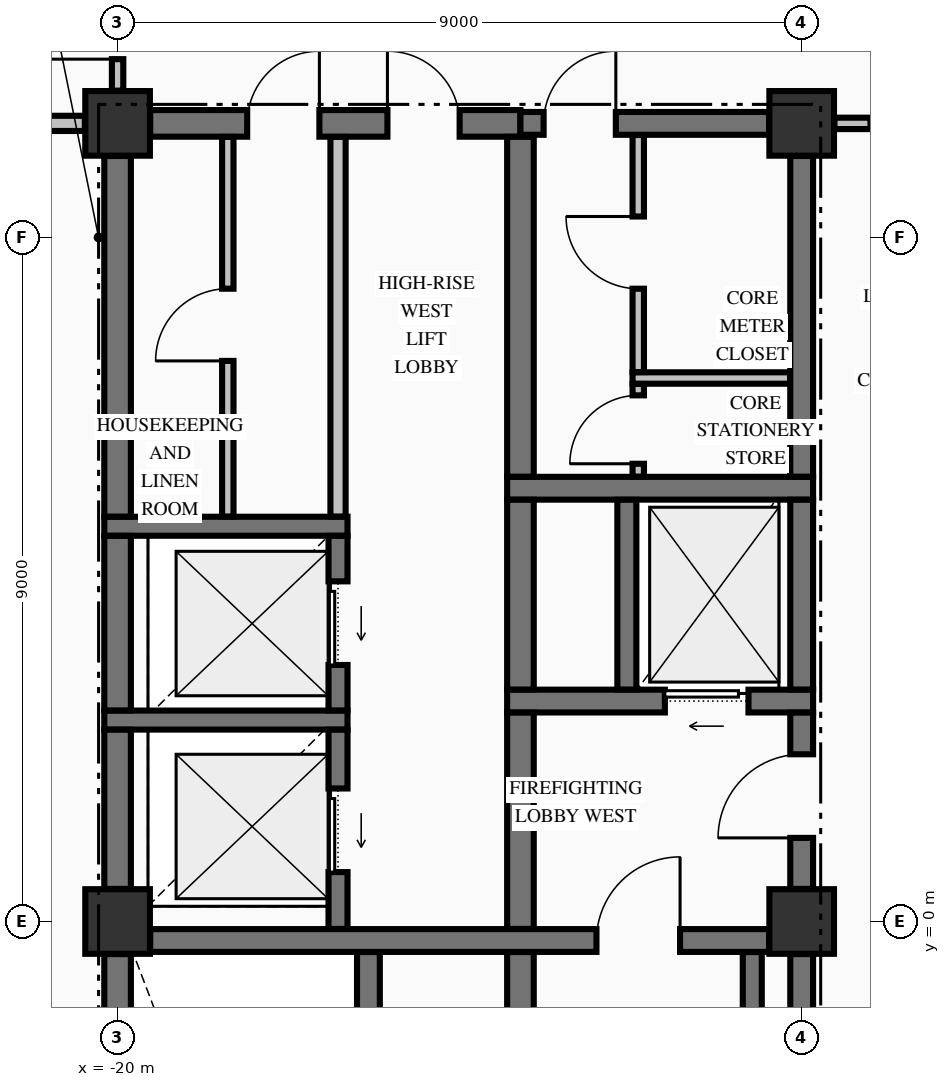
"""IFC4 building model, lengths in metres.
Left out: names, types, materials, properties, quantities, classifications, styles, units other than length and angle.
Written with IfcOpenShell. Run it as: python <this file> out.ifc"""

import sys

from ifc_helpers import new_model, si_unit, direction, frame, frame_2d, origin, origin_2d, place, context, subcontext, project, spatial, rectangle, extrude, element, fill, save


model = new_model("IFC4")
c1 = context("Model", 3, precision=1e-05, world=origin(), true_north=direction((0.0, 1.0)))
c2 = subcontext(c1, "Body", "Model", "MODEL_VIEW")
j1 = project(units=[si_unit("LENGTHUNIT", "METRE"), si_unit("PLANEANGLEUNIT", "RADIAN")], contexts=[c1])
p1 = place(None, origin())
s1 = spatial("IfcSite", under=j1, at=p1, CompositionType="ELEMENT")
p2 = place(p1, origin())
s2 = spatial("IfcBuilding", under=s1, at=p2, CompositionType="ELEMENT")
p3 = place(p2, frame((0.0, 0.0, 218.66)))
s3 = spatial("IfcBuildingStorey", under=s2, at=p3, CompositionType="ELEMENT", Elevation=218.66)
for number, where, z_axis, x_axis in (
    (1, (-20.0, 10.5, -0.25), (0.0, 0.0, 1.0), (1.0, 0.0, 0.0)),
    (2, (-11.0, 0.0, -0.25), (0.0, 0.0, 1.0), (1.0, 0.0, 0.0)),
    (3, (-11.0, 10.5, -0.25), (0.0, 0.0, 1.0), (1.0, 0.0, 0.0)),
    (4, (-20.0, 0.0, -0.25), (0.0, 0.0, 1.0), (1.0, 0.0, 0.0)),
):
    element("IfcColumn", number, at=place(p3, frame(where, z_axis=z_axis, x_axis=x_axis)), inside=s3, PredefinedType="COLUMN", context=c2, shape_type="SweptSolid", body=[
        extrude(rectangle(XDim=0.85, YDim=0.85, at=origin_2d()), origin(), (0.0, 0.0, 1.0), 3.225),
    ])
p4 = place(p3, frame((-19.571, -0.25, 0.0), z_axis=(0.0, 0.0, 1.0), x_axis=(1.0, 0.0, 0.0)))
e5 = element("IfcWall", 5, at=p4, inside=s3, PredefinedType="SHEAR", context=c2, shape_type="SweptSolid", body=[
    extrude(rectangle(XDim=8.142, YDim=0.3, at=frame_2d((4.071, 0.0))), origin(), (0.0, 0.0, 1.0), 2.975),
])
p5 = place(p4, frame((5.871, 0.0, 0.0)))
e6 = element("IfcOpeningElement", 6, at=p5, cuts=e5, PredefinedType="OPENING", context=c2, shape_type="SweptSolid", body=[
    extrude(rectangle(XDim=1.1, YDim=2.15, at=frame_2d((0.55, 1.075))), frame((0.0, 0.16, 0.0), z_axis=(0.0, -1.0, 0.0), x_axis=(1.0, 0.0, 0.0)), (0.0, 0.0, 1.0), 0.32),
])
p6 = place(p3, frame((-20.175, 2.65, 0.0), z_axis=(0.0, 0.0, 1.0), x_axis=(1.0, 0.0, 0.0)))
e7 = element("IfcWall", 7, at=p6, inside=s3, PredefinedType="SOLIDWALL", context=c2, shape_type="SweptSolid", body=[
    extrude(rectangle(XDim=3.2, YDim=0.25, at=frame_2d((1.6, 0.0))), origin(), (0.0, 0.0, 1.0), 2.975),
])
p7 = place(p3, frame((-14.875, 2.9, 0.0), z_axis=(0.0, 0.0, 1.0), x_axis=(1.0, 0.0, 0.0)))
e8 = element("IfcWall", 8, at=p7, inside=s3, PredefinedType="SHEAR", context=c2, shape_type="SweptSolid", body=[
    extrude(rectangle(XDim=4.025, YDim=0.3, at=frame_2d((2.012, 0.0))), origin(), (0.0, 0.0, 1.0), 2.975),
])
p8 = place(p7, frame((2.075, 0.0, 0.0)))
e9 = element("IfcOpeningElement", 9, at=p8, cuts=e8, PredefinedType="OPENING", context=c2, shape_type="SweptSolid", body=[
    extrude(rectangle(XDim=1.1, YDim=2.2, at=frame_2d((0.55, 1.1))), frame((0.0, 0.16, 0.0), z_axis=(0.0, -1.0, 0.0), x_axis=(1.0, 0.0, 0.0)), (0.0, 0.0, 1.0), 0.32),
])
p9 = place(p3, frame((-20.175, 5.2, 0.0), z_axis=(0.0, 0.0, 1.0), x_axis=(1.0, 0.0, 0.0)))
e10 = element("IfcWall", 10, at=p9, inside=s3, PredefinedType="SOLIDWALL", context=c2, shape_type="SweptSolid", body=[
    extrude(rectangle(XDim=3.2, YDim=0.25, at=frame_2d((1.6, 0.0))), origin(), (0.0, 0.0, 1.0), 2.975),
])
p10 = place(p3, frame((-14.875, 5.7, 0.0), z_axis=(0.0, 0.0, 1.0), x_axis=(1.0, 0.0, 0.0)))
e11 = element("IfcWall", 11, at=p10, inside=s3, PredefinedType="SHEAR", context=c2, shape_type="SweptSolid", body=[
    extrude(rectangle(XDim=4.025, YDim=0.3, at=frame_2d((2.012, 0.0))), origin(), (0.0, 0.0, 1.0), 2.975),
])
p11 = place(p3, frame((-19.571, 10.5, 0.0), z_axis=(0.0, 0.0, 1.0), x_axis=(1.0, 0.0, 0.0)))
e12 = element("IfcWall", 12, at=p11, inside=s3, PredefinedType="SHEAR", context=c2, shape_type="SweptSolid", body=[
    extrude(rectangle(XDim=4.871, YDim=0.35, at=frame_2d((2.436, 0.0))), origin(), (0.0, 0.0, 1.0), 2.975),
])
p12 = place(p11, frame((3.121, 0.0, 0.0)))
e13 = element("IfcOpeningElement", 13, at=p12, cuts=e12, PredefinedType="OPENING", context=c2, shape_type="SweptSolid", body=[
    extrude(rectangle(XDim=0.95, YDim=2.02, at=frame_2d((0.475, 1.01))), frame((0.0, 0.185, 0.0), z_axis=(0.0, -1.0, 0.0), x_axis=(1.0, 0.0, 0.0)), (0.0, 0.0, 1.0), 0.37),
])
p13 = place(p11, frame((1.276, 0.0, 0.0)))
e14 = element("IfcOpeningElement", 14, at=p13, cuts=e12, PredefinedType="OPENING", context=c2, shape_type="SweptSolid", body=[
    extrude(rectangle(XDim=0.95, YDim=2.02, at=frame_2d((0.475, 1.01))), frame((0.0, 0.185, 0.0), z_axis=(0.0, -1.0, 0.0), x_axis=(1.0, 0.0, 0.0)), (0.0, 0.0, 1.0), 0.37),
])
p14 = place(p3, frame((-14.7, 10.5, 0.0), z_axis=(0.0, 0.0, 1.0), x_axis=(1.0, 0.0, 0.0)))
e15 = element("IfcWall", 15, at=p14, inside=s3, PredefinedType="SHEAR", context=c2, shape_type="SweptSolid", body=[
    extrude(rectangle(XDim=3.271, YDim=0.3, at=frame_2d((1.635, 0.0))), origin(), (0.0, 0.0, 1.0), 2.975),
])
p15 = place(p14, frame((0.305, 0.0, 0.0)))
e16 = element("IfcOpeningElement", 16, at=p15, cuts=e15, PredefinedType="OPENING", context=c2, shape_type="SweptSolid", body=[
    extrude(rectangle(XDim=0.95, YDim=2.02, at=frame_2d((0.475, 1.01))), frame((0.0, 0.16, 0.0), z_axis=(0.0, -1.0, 0.0), x_axis=(1.0, 0.0, 0.0)), (0.0, 0.0, 1.0), 0.32),
])
p16 = place(p3, frame((-13.225, 7.15, 0.0), z_axis=(0.0, 0.0, 1.0), x_axis=(1.0, 0.0, 0.0)))
e17 = element("IfcWall", 17, at=p16, inside=s3, PredefinedType="PARTITIONING", context=c2, shape_type="SweptSolid", body=[
    extrude(rectangle(XDim=2.072, YDim=0.15, at=frame_2d((1.036, 0.0))), origin(), (0.0, 0.0, 1.0), 2.975),
])
p17 = place(p3, frame((-26.835, 10.5, 0.0), z_axis=(0.0, 0.0, 1.0), x_axis=(1.0, 0.0, 0.0)))
e18 = element("IfcWall", 18, at=p17, inside=s3, PredefinedType="PARTITIONING", context=c2, shape_type="SweptSolid", body=[
    extrude(rectangle(XDim=6.404, YDim=0.2, at=frame_2d((3.202, 0.0))), origin(), (0.0, 0.0, 1.0), 2.975),
])
p18 = place(p17, frame((2.86, 0.0, 0.0)))
e19 = element("IfcOpeningElement", 19, at=p18, cuts=e18, PredefinedType="OPENING", context=c2, shape_type="SweptSolid", body=[
    extrude(rectangle(XDim=0.95, YDim=2.15, at=frame_2d((0.475, 1.075))), frame((0.0, 0.11, 0.0), z_axis=(0.0, -1.0, 0.0), x_axis=(1.0, 0.0, 0.0)), (0.0, 0.0, 1.0), 0.22),
])
p19 = place(p3, frame((-10.569, 10.5, 0.0), z_axis=(0.0, 0.0, 1.0), x_axis=(1.0, 0.0, 0.0)))
e20 = element("IfcWall", 20, at=p19, inside=s3, PredefinedType="PARTITIONING", context=c2, shape_type="SweptSolid", body=[
    extrude(rectangle(XDim=21.138, YDim=0.15, at=frame_2d((10.569, 0.0))), origin(), (0.0, 0.0, 1.0), 2.975),
])
p20 = place(p19, frame((0.474, 0.0, 0.0)))
e21 = element("IfcOpeningElement", 21, at=p20, cuts=e20, PredefinedType="OPENING", context=c2, shape_type="SweptSolid", body=[
    extrude(rectangle(XDim=1.05, YDim=2.15, at=frame_2d((0.525, 1.075))), frame((0.0, 0.085, 0.0), z_axis=(0.0, -1.0, 0.0), x_axis=(1.0, 0.0, 0.0)), (0.0, 0.0, 1.0), 0.17),
])
p21 = place(p19, frame((19.614, 0.0, 0.0)))
e22 = element("IfcOpeningElement", 22, at=p21, cuts=e20, PredefinedType="OPENING", context=c2, shape_type="SweptSolid", body=[
    extrude(rectangle(XDim=1.05, YDim=2.15, at=frame_2d((0.525, 1.075))), frame((0.0, 0.085, 0.0), z_axis=(0.0, -1.0, 0.0), x_axis=(1.0, 0.0, 0.0)), (0.0, 0.0, 1.0), 0.17),
])
p22 = place(p3, frame((-20.0, -9.521, 0.0), z_axis=(0.0, 0.0, 1.0), x_axis=(0.0, 1.0, 0.0)))
e23 = element("IfcWall", 23, at=p22, inside=s3, PredefinedType="SHEAR", context=c2, shape_type="SweptSolid", body=[
    extrude(rectangle(XDim=9.092, YDim=0.35, at=frame_2d((4.546, 0.0))), origin(), (0.0, 0.0, 1.0), 2.975),
])
p23 = place(p3, frame((-20.0, 0.429, 0.0), z_axis=(0.0, 0.0, 1.0), x_axis=(0.0, 1.0, 0.0)))
e24 = element("IfcWall", 24, at=p23, inside=s3, PredefinedType="SHEAR", context=c2, shape_type="SweptSolid", body=[
    extrude(rectangle(XDim=2.094, YDim=0.35, at=frame_2d((1.047, 0.0))), origin(), (0.0, 0.0, 1.0), 2.975),
])
p24 = place(p3, frame((-20.0, 2.777, 0.0), z_axis=(0.0, 0.0, 1.0), x_axis=(0.0, 1.0, 0.0)))
e25 = element("IfcWall", 25, at=p24, inside=s3, PredefinedType="SHEAR", context=c2, shape_type="SweptSolid", body=[
    extrude(rectangle(XDim=2.296, YDim=0.35, at=frame_2d((1.148, 0.0))), origin(), (0.0, 0.0, 1.0), 2.975),
])
p25 = place(p3, frame((-20.0, 5.327, 0.0), z_axis=(0.0, 0.0, 1.0), x_axis=(0.0, 1.0, 0.0)))
e26 = element("IfcWall", 26, at=p25, inside=s3, PredefinedType="SHEAR", context=c2, shape_type="SweptSolid", body=[
    extrude(rectangle(XDim=4.744, YDim=0.35, at=frame_2d((2.372, 0.0))), origin(), (0.0, 0.0, 1.0), 2.975),
])
p26 = place(p3, frame((-17.1, -0.098, 0.0), z_axis=(0.0, 0.0, 1.0), x_axis=(0.0, 1.0, 0.0)))
e27 = element("IfcWall", 27, at=p26, inside=s3, PredefinedType="SOLIDWALL", context=c2, shape_type="SweptSolid", body=[
    extrude(rectangle(XDim=2.621, YDim=0.25, at=frame_2d((1.311, 0.0))), origin(), (0.0, 0.0, 1.0), 2.975),
])
p27 = place(p26, frame((0.748, 0.0, 0.0)))
e28 = element("IfcOpeningElement", 28, at=p27, cuts=e27, PredefinedType="OPENING", context=c2, shape_type="SweptSolid", body=[
    extrude(rectangle(XDim=1.1, YDim=2.2, at=frame_2d((0.55, 1.1))), frame((0.0, 0.135, 0.0), z_axis=(0.0, -1.0, 0.0), x_axis=(1.0, 0.0, 0.0)), (0.0, 0.0, 1.0), 0.27),
])
p28 = place(p3, frame((-17.1, 2.777, 0.0), z_axis=(0.0, 0.0, 1.0), x_axis=(0.0, 1.0, 0.0)))
e29 = element("IfcWall", 29, at=p28, inside=s3, PredefinedType="SOLIDWALL", context=c2, shape_type="SweptSolid", body=[
    extrude(rectangle(XDim=2.296, YDim=0.25, at=frame_2d((1.148, 0.0))), origin(), (0.0, 0.0, 1.0), 2.975),
])
p29 = place(p28, frame((0.598, 0.0, 0.0)))
e30 = element("IfcOpeningElement", 30, at=p29, cuts=e29, PredefinedType="OPENING", context=c2, shape_type="SweptSolid", body=[
    extrude(rectangle(XDim=1.1, YDim=2.2, at=frame_2d((0.55, 1.1))), frame((0.0, 0.135, 0.0), z_axis=(0.0, -1.0, 0.0), x_axis=(1.0, 0.0, 0.0)), (0.0, 0.0, 1.0), 0.27),
])
p30 = place(p3, frame((-16.7, -9.773, 0.0), z_axis=(0.0, 0.0, 1.0), x_axis=(0.0, 1.0, 0.0)))
e31 = element("IfcWall", 31, at=p30, inside=s3, PredefinedType="SHEAR", context=c2, shape_type="SweptSolid", body=[
    extrude(rectangle(XDim=9.371, YDim=0.3, at=frame_2d((4.686, 0.0))), origin(), (0.0, 0.0, 1.0), 2.975),
])
p31 = place(p3, frame((-14.7, -9.773, 0.0), z_axis=(0.0, 0.0, 1.0), x_axis=(0.0, 1.0, 0.0)))
e32 = element("IfcWall", 32, at=p31, inside=s3, PredefinedType="SHEAR", context=c2, shape_type="SweptSolid", body=[
    extrude(rectangle(XDim=9.371, YDim=0.35, at=frame_2d((4.686, 0.0))), origin(), (0.0, 0.0, 1.0), 2.975),
])
p32 = place(p3, frame((-14.7, -0.098, 0.0), z_axis=(0.0, 0.0, 1.0), x_axis=(0.0, 1.0, 0.0)))
e33 = element("IfcWall", 33, at=p32, inside=s3, PredefinedType="SHEAR", context=c2, shape_type="SweptSolid", body=[
    extrude(rectangle(XDim=2.846, YDim=0.35, at=frame_2d((1.423, 0.0))), origin(), (0.0, 0.0, 1.0), 2.975),
])
p33 = place(p3, frame((-14.7, 3.052, 0.0), z_axis=(0.0, 0.0, 1.0), x_axis=(0.0, 1.0, 0.0)))
e34 = element("IfcWall", 34, at=p33, inside=s3, PredefinedType="SHEAR", context=c2, shape_type="SweptSolid", body=[
    extrude(rectangle(XDim=2.496, YDim=0.35, at=frame_2d((1.248, 0.0))), origin(), (0.0, 0.0, 1.0), 2.975),
])
p34 = place(p3, frame((-14.7, 5.852, 0.0), z_axis=(0.0, 0.0, 1.0), x_axis=(0.0, 1.0, 0.0)))
e35 = element("IfcWall", 35, at=p34, inside=s3, PredefinedType="SHEAR", context=c2, shape_type="SweptSolid", body=[
    extrude(rectangle(XDim=4.471, YDim=0.35, at=frame_2d((2.235, 0.0))), origin(), (0.0, 0.0, 1.0), 2.975),
])
p35 = place(p3, frame((-13.3, 3.052, 0.0), z_axis=(0.0, 0.0, 1.0), x_axis=(0.0, 1.0, 0.0)))
e36 = element("IfcWall", 36, at=p35, inside=s3, PredefinedType="SOLIDWALL", context=c2, shape_type="SweptSolid", body=[
    extrude(rectangle(XDim=2.496, YDim=0.25, at=frame_2d((1.248, 0.0))), origin(), (0.0, 0.0, 1.0), 2.975),
])
p36 = place(p3, frame((-11.65, -9.798, 0.0), z_axis=(0.0, 0.0, 1.0), x_axis=(0.0, 1.0, 0.0)))
e37 = element("IfcWall", 37, at=p36, inside=s3, PredefinedType="SOLIDWALL", context=c2, shape_type="SweptSolid", body=[
    extrude(rectangle(XDim=9.396, YDim=0.25, at=frame_2d((4.698, 0.0))), origin(), (0.0, 0.0, 1.0), 2.975),
])
p37 = place(p3, frame((-11.0, -9.521, 0.0), z_axis=(0.0, 0.0, 1.0), x_axis=(0.0, 1.0, 0.0)))
e38 = element("IfcWall", 38, at=p37, inside=s3, PredefinedType="SHEAR", context=c2, shape_type="SweptSolid", body=[
    extrude(rectangle(XDim=9.092, YDim=0.3, at=frame_2d((4.546, 0.0))), origin(), (0.0, 0.0, 1.0), 2.975),
])
p38 = place(p3, frame((-11.0, 0.429, 0.0), z_axis=(0.0, 0.0, 1.0), x_axis=(0.0, 1.0, 0.0)))
e39 = element("IfcWall", 39, at=p38, inside=s3, PredefinedType="SHEAR", context=c2, shape_type="SweptSolid", body=[
    extrude(rectangle(XDim=2.319, YDim=0.3, at=frame_2d((1.16, 0.0))), origin(), (0.0, 0.0, 1.0), 2.975),
])
p39 = place(p38, frame((0.671, 0.0, 0.0)))
e40 = element("IfcOpeningElement", 40, at=p39, cuts=e39, PredefinedType="OPENING", context=c2, shape_type="SweptSolid", body=[
    extrude(rectangle(XDim=1.1, YDim=2.15, at=frame_2d((0.55, 1.075))), frame((0.0, 0.16, 0.0), z_axis=(0.0, -1.0, 0.0), x_axis=(1.0, 0.0, 0.0)), (0.0, 0.0, 1.0), 0.32),
])
p40 = place(p3, frame((-11.0, 3.052, 0.0), z_axis=(0.0, 0.0, 1.0), x_axis=(0.0, 1.0, 0.0)))
e41 = element("IfcWall", 41, at=p40, inside=s3, PredefinedType="SHEAR", context=c2, shape_type="SweptSolid", body=[
    extrude(rectangle(XDim=2.496, YDim=0.3, at=frame_2d((1.248, 0.0))), origin(), (0.0, 0.0, 1.0), 2.975),
])
p41 = place(p3, frame((-11.0, 5.852, 0.0), z_axis=(0.0, 0.0, 1.0), x_axis=(0.0, 1.0, 0.0)))
e42 = element("IfcWall", 42, at=p41, inside=s3, PredefinedType="SHEAR", context=c2, shape_type="SweptSolid", body=[
    extrude(rectangle(XDim=4.219, YDim=0.3, at=frame_2d((2.109, 0.0))), origin(), (0.0, 0.0, 1.0), 2.975),
])
p42 = place(p3, frame((-20.0, 10.931, 0.0), z_axis=(0.0, 0.0, 1.0), x_axis=(0.0, 1.0, 0.0)))
e43 = element("IfcWall", 43, at=p42, inside=s3, PredefinedType="PARTITIONING", context=c2, shape_type="SweptSolid", body=[
    extrude(rectangle(XDim=2.116, YDim=0.15, at=frame_2d((1.058, 0.0))), origin(), (0.0, 0.0, 1.0), 2.167),
])
p43 = place(p42, frame((0.414, 0.0, 0.0)))
e44 = element("IfcOpeningElement", 44, at=p43, cuts=e43, PredefinedType="OPENING", context=c2, shape_type="SweptSolid", body=[
    extrude(rectangle(XDim=0.95, YDim=2.02, at=frame_2d((0.475, 1.01))), frame((0.0, 0.085, 0.0), z_axis=(0.0, -1.0, 0.0), x_axis=(1.0, 0.0, 0.0)), (0.0, 0.0, 1.0), 0.17),
])
p44 = place(p3, frame((-18.55, 5.328, 0.0), z_axis=(0.0, 0.0, 1.0), x_axis=(0.0, 1.0, 0.0)))
e45 = element("IfcWall", 45, at=p44, inside=s3, PredefinedType="PARTITIONING", context=c2, shape_type="SweptSolid", body=[
    extrude(rectangle(XDim=4.994, YDim=0.15, at=frame_2d((2.497, 0.0))), origin(), (0.0, 0.0, 1.0), 2.975),
])
p45 = place(p44, frame((2.047, 0.0, 0.0)))
e46 = element("IfcOpeningElement", 46, at=p45, cuts=e45, PredefinedType="OPENING", context=c2, shape_type="SweptSolid", body=[
    extrude(rectangle(XDim=0.95, YDim=2.15, at=frame_2d((0.475, 1.075))), frame((0.0, 0.085, 0.0), z_axis=(0.0, -1.0, 0.0), x_axis=(1.0, 0.0, 0.0)), (0.0, 0.0, 1.0), 0.17),
])
p46 = place(p3, frame((-17.1, 5.328, 0.0), z_axis=(0.0, 0.0, 1.0), x_axis=(0.0, 1.0, 0.0)))
e47 = element("IfcWall", 47, at=p46, inside=s3, PredefinedType="PARTITIONING", context=c2, shape_type="SweptSolid", body=[
    extrude(rectangle(XDim=4.994, YDim=0.2, at=frame_2d((2.497, 0.0))), origin(), (0.0, 0.0, 1.0), 2.975),
])
p47 = place(p3, frame((-13.15, 5.853, 0.0), z_axis=(0.0, 0.0, 1.0), x_axis=(0.0, 1.0, 0.0)))
e48 = element("IfcWall", 48, at=p47, inside=s3, PredefinedType="PARTITIONING", context=c2, shape_type="SweptSolid", body=[
    extrude(rectangle(XDim=1.219, YDim=0.15, at=frame_2d((0.609, 0.0))), origin(), (0.0, 0.0, 1.0), 2.975),
])
p48 = place(p47, frame((0.169, 0.0, 0.0)))
e49 = element("IfcOpeningElement", 49, at=p48, cuts=e48, PredefinedType="OPENING", context=c2, shape_type="SweptSolid", body=[
    extrude(rectangle(XDim=0.9, YDim=2.15, at=frame_2d((0.45, 1.075))), frame((0.0, 0.085, 0.0), z_axis=(0.0, -1.0, 0.0), x_axis=(1.0, 0.0, 0.0)), (0.0, 0.0, 1.0), 0.17),
])
p49 = place(p3, frame((-13.15, 7.228, 0.0), z_axis=(0.0, 0.0, 1.0), x_axis=(0.0, 1.0, 0.0)))
e50 = element("IfcWall", 50, at=p49, inside=s3, PredefinedType="PARTITIONING", context=c2, shape_type="SweptSolid", body=[
    extrude(rectangle(XDim=3.119, YDim=0.15, at=frame_2d((1.56, 0.0))), origin(), (0.0, 0.0, 1.0), 2.975),
])
p50 = place(p49, frame((1.097, 0.0, 0.0)))
e51 = element("IfcOpeningElement", 51, at=p50, cuts=e50, PredefinedType="OPENING", context=c2, shape_type="SweptSolid", body=[
    extrude(rectangle(XDim=0.95, YDim=2.15, at=frame_2d((0.475, 1.075))), frame((0.0, 0.085, 0.0), z_axis=(0.0, -1.0, 0.0), x_axis=(1.0, 0.0, 0.0)), (0.0, 0.0, 1.0), 0.17),
])
p51 = place(p5, origin())
e52 = element("IfcDoor", 52, at=p51, inside=s3, OperationType="SINGLE_SWING_RIGHT", PredefinedType="DOOR", context=c2, shape_type="SweptSolid", body=[
    extrude(rectangle(XDim=1.1, YDim=2.15, at=frame_2d((0.55, 1.075))), frame((0.0, 0.025, 0.0), z_axis=(0.0, -1.0, 0.0), x_axis=(1.0, 0.0, 0.0)), (0.0, 0.0, 1.0), 0.05),
])
fill(e6, e52)
p52 = place(p39, origin())
e53 = element("IfcDoor", 53, at=p52, inside=s3, OperationType="SINGLE_SWING_LEFT", PredefinedType="DOOR", context=c2, shape_type="SweptSolid", body=[
    extrude(rectangle(XDim=1.1, YDim=2.15, at=frame_2d((0.55, 1.075))), frame((0.0, 0.025, 0.0), z_axis=(0.0, -1.0, 0.0), x_axis=(1.0, 0.0, 0.0)), (0.0, 0.0, 1.0), 0.05),
])
fill(e40, e53)
p53 = place(p8, origin())
e54 = element("IfcDoor", 54, at=p53, inside=s3, OperationType="SLIDING_TO_LEFT", PredefinedType="DOOR", context=c2, shape_type="SweptSolid", body=[
    extrude(rectangle(XDim=1.1, YDim=2.2, at=frame_2d((0.55, 1.1))), frame((0.0, 0.025, 0.0), z_axis=(0.0, -1.0, 0.0), x_axis=(1.0, 0.0, 0.0)), (0.0, 0.0, 1.0), 0.05),
])
fill(e9, e54)
p54 = place(p15, origin())
e55 = element("IfcDoor", 55, at=p54, inside=s3, OperationType="SINGLE_SWING_RIGHT", PredefinedType="DOOR", context=c2, shape_type="SweptSolid", body=[
    extrude(rectangle(XDim=0.95, YDim=2.02, at=frame_2d((0.475, 1.01))), frame((0.0, 0.025, 0.0), z_axis=(0.0, -1.0, 0.0), x_axis=(1.0, 0.0, 0.0)), (0.0, 0.0, 1.0), 0.05),
])
fill(e16, e55)
p55 = place(p48, origin())
e56 = element("IfcDoor", 56, at=p55, inside=s3, OperationType="SINGLE_SWING_LEFT", PredefinedType="DOOR", context=c2, shape_type="SweptSolid", body=[
    extrude(rectangle(XDim=0.9, YDim=2.15, at=frame_2d((0.45, 1.075))), frame((0.0, 0.025, 0.0), z_axis=(0.0, -1.0, 0.0), x_axis=(1.0, 0.0, 0.0)), (0.0, 0.0, 1.0), 0.05),
])
fill(e49, e56)
p56 = place(p50, origin())
e57 = element("IfcDoor", 57, at=p56, inside=s3, OperationType="SINGLE_SWING_RIGHT", PredefinedType="DOOR", context=c2, shape_type="SweptSolid", body=[
    extrude(rectangle(XDim=0.95, YDim=2.15, at=frame_2d((0.475, 1.075))), frame((0.0, 0.025, 0.0), z_axis=(0.0, -1.0, 0.0), x_axis=(1.0, 0.0, 0.0)), (0.0, 0.0, 1.0), 0.05),
])
fill(e51, e57)
p57 = place(p27, origin())
e58 = element("IfcDoor", 58, at=p57, inside=s3, OperationType="SLIDING_TO_LEFT", PredefinedType="DOOR", context=c2, shape_type="SweptSolid", body=[
    extrude(rectangle(XDim=1.1, YDim=2.2, at=frame_2d((0.55, 1.1))), frame((0.0, 0.025, 0.0), z_axis=(0.0, -1.0, 0.0), x_axis=(1.0, 0.0, 0.0)), (0.0, 0.0, 1.0), 0.05),
])
fill(e28, e58)
p58 = place(p29, origin())
e59 = element("IfcDoor", 59, at=p58, inside=s3, OperationType="SLIDING_TO_LEFT", PredefinedType="DOOR", context=c2, shape_type="SweptSolid", body=[
    extrude(rectangle(XDim=1.1, YDim=2.2, at=frame_2d((0.55, 1.1))), frame((0.0, 0.025, 0.0), z_axis=(0.0, -1.0, 0.0), x_axis=(1.0, 0.0, 0.0)), (0.0, 0.0, 1.0), 0.05),
])
fill(e30, e59)
p59 = place(p12, origin())
e60 = element("IfcDoor", 60, at=p59, inside=s3, OperationType="SINGLE_SWING_LEFT", PredefinedType="DOOR", context=c2, shape_type="SweptSolid", body=[
    extrude(rectangle(XDim=0.95, YDim=2.02, at=frame_2d((0.475, 1.01))), frame((0.0, 0.025, 0.0), z_axis=(0.0, -1.0, 0.0), x_axis=(1.0, 0.0, 0.0)), (0.0, 0.0, 1.0), 0.05),
])
fill(e13, e60)
p60 = place(p13, origin())
e61 = element("IfcDoor", 61, at=p60, inside=s3, OperationType="SINGLE_SWING_RIGHT", PredefinedType="DOOR", context=c2, shape_type="SweptSolid", body=[
    extrude(rectangle(XDim=0.95, YDim=2.02, at=frame_2d((0.475, 1.01))), frame((0.0, 0.025, 0.0), z_axis=(0.0, -1.0, 0.0), x_axis=(1.0, 0.0, 0.0)), (0.0, 0.0, 1.0), 0.05),
])
fill(e14, e61)
p61 = place(p45, origin())
e62 = element("IfcDoor", 62, at=p61, inside=s3, OperationType="SINGLE_SWING_LEFT", PredefinedType="DOOR", context=c2, shape_type="SweptSolid", body=[
    extrude(rectangle(XDim=0.95, YDim=2.15, at=frame_2d((0.475, 1.075))), frame((0.0, 0.025, 0.0), z_axis=(0.0, -1.0, 0.0), x_axis=(1.0, 0.0, 0.0)), (0.0, 0.0, 1.0), 0.05),
])
fill(e46, e62)
p62 = place(p43, origin())
e63 = element("IfcDoor", 63, at=p62, inside=s3, OperationType="SINGLE_SWING_LEFT", PredefinedType="DOOR", context=c2, shape_type="SweptSolid", body=[
    extrude(rectangle(XDim=0.95, YDim=2.02, at=frame_2d((0.475, 1.01))), frame((0.0, 0.025, 0.0), z_axis=(0.0, -1.0, 0.0), x_axis=(1.0, 0.0, 0.0)), (0.0, 0.0, 1.0), 0.05),
])
fill(e44, e63)
save(model, sys.argv[1])
